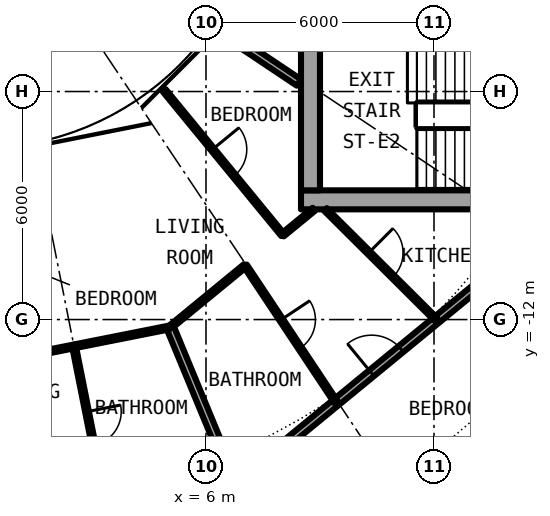
"""IFC4 building model, lengths in metres.
Left out: names, types, materials, properties, quantities, classifications, styles, units other than length and angle.
Written with IfcOpenShell. Run it as: python <this file> out.ifc"""

import sys

from ifc_helpers import new_model, si_unit, direction, frame, frame_2d, origin, place, context, subcontext, project, spatial, rectangle, extrude, element, fill, save


model = new_model("IFC4")
c1 = context("Model", 3, precision=1e-05, world=origin(), true_north=direction((0.0, 1.0)))
c2 = subcontext(c1, "Body", "Model", "MODEL_VIEW")
j1 = project(units=[si_unit("LENGTHUNIT", "METRE"), si_unit("PLANEANGLEUNIT", "RADIAN")], contexts=[c1])
p1 = place(None, origin())
s1 = spatial("IfcSite", under=j1, at=p1, CompositionType="ELEMENT")
p2 = place(p1, origin())
s2 = spatial("IfcBuilding", under=s1, at=p2, CompositionType="ELEMENT")
p3 = place(p2, frame((0.0, 0.0, 161.6)))
s3 = spatial("IfcBuildingStorey", under=s2, at=p3, CompositionType="ELEMENT", Elevation=161.6)
p4 = place(p3, frame((8.5, -8.85, 0.0), z_axis=(0.0, 0.0, 1.0), x_axis=(1.0, 0.0, 0.0)))
e1 = element("IfcWall", 1, at=p4, inside=s3, PredefinedType="SHEAR", context=c2, shape_type="SweptSolid", body=[
    extrude(rectangle(XDim=13.6, YDim=0.5, at=frame_2d((6.8, 0.0))), origin(), (0.0, 0.0, 1.0), 3.05),
])
p5 = place(p4, frame((11.375, 0.0, 0.0)))
e2 = element("IfcOpeningElement", 2, at=p5, cuts=e1, PredefinedType="OPENING", context=c2, shape_type="SweptSolid", body=[
    extrude(rectangle(XDim=1.2, YDim=2.3, at=frame_2d((0.6, 1.15))), frame((0.0, 0.26, 0.0), z_axis=(0.0, -1.0, 0.0), x_axis=(1.0, 0.0, 0.0)), (0.0, 0.0, 1.0), 0.52),
])
p6 = place(p3, frame((8.75, -8.6, 0.0), z_axis=(0.0, 0.0, 1.0), x_axis=(0.0, 1.0, 0.0)))
e3 = element("IfcWall", 3, at=p6, inside=s3, PredefinedType="SHEAR", context=c2, shape_type="SweptSolid", body=[
    extrude(rectangle(XDim=17.2, YDim=0.5, at=frame_2d((8.6, 0.0))), origin(), (0.0, 0.0, 1.0), 3.05),
])
p7 = place(p6, frame((7.4, 0.0, 0.1)))
e4 = element("IfcOpeningElement", 4, at=p7, cuts=e3, PredefinedType="OPENING", context=c2, shape_type="SweptSolid", body=[
    extrude(rectangle(XDim=2.4, YDim=2.2, at=frame_2d((1.2, 1.1))), frame((0.0, 0.26, 0.0), z_axis=(0.0, -1.0, 0.0), x_axis=(1.0, 0.0, 0.0)), (0.0, 0.0, 1.0), 0.52),
])
p8 = place(p3, frame((10.512, -19.667, 0.0), z_axis=(0.0, 0.0, 1.0), x_axis=(0.740947367223, 0.671563101283, 0.0)))
e5 = element("IfcWall", 5, at=p8, inside=s3, PredefinedType="PARTITIONING", context=c2, shape_type="SweptSolid", body=[
    extrude(rectangle(XDim=10.837, YDim=0.2, at=frame_2d((5.419, 0.0))), origin(), (0.0, 0.0, 1.0), 2.7),
])
p9 = place(p8, frame((3.835, 0.0, 0.0)))
e6 = element("IfcOpeningElement", 6, at=p9, cuts=e5, PredefinedType="OPENING", context=c2, shape_type="SweptSolid", body=[
    extrude(rectangle(XDim=1.0, YDim=2.3, at=frame_2d((0.5, 1.15))), frame((0.0, 0.11, 0.0), z_axis=(0.0, -1.0, 0.0), x_axis=(1.0, 0.0, 0.0)), (0.0, 0.0, 1.0), 0.22),
])
p10 = place(p3, frame((6.773, -16.353, 0.0), z_axis=(0.0, 0.0, 1.0), x_axis=(0.773034536097, 0.634363938131, 0.0)))
e7 = element("IfcWall", 7, at=p10, inside=s3, PredefinedType="PARTITIONING", context=c2, shape_type="SweptSolid", body=[
    extrude(rectangle(XDim=10.277, YDim=0.2, at=frame_2d((5.138, 0.0))), origin(), (0.0, 0.0, 1.0), 2.7),
])
p11 = place(p10, frame((4.638, 0.0, 0.0)))
e8 = element("IfcOpeningElement", 8, at=p11, cuts=e7, PredefinedType="OPENING", context=c2, shape_type="SweptSolid", body=[
    extrude(rectangle(XDim=1.0, YDim=2.3, at=frame_2d((0.5, 1.15))), frame((0.0, 0.11, 0.0), z_axis=(0.0, -1.0, 0.0), x_axis=(1.0, 0.0, 0.0)), (0.0, 0.0, 1.0), 0.22),
])
p12 = place(p3, frame((0.0, -13.209, 0.0), z_axis=(0.0, 0.0, 1.0), x_axis=(0.980766092797, 0.195186759846, 0.0)))
e9 = element("IfcWall", 9, at=p12, inside=s3, PredefinedType="PARTITIONING", context=c2, shape_type="SweptSolid", body=[
    extrude(rectangle(XDim=2.577, YDim=0.1, at=frame_2d((1.288, 0.0))), origin(), (0.0, 0.0, 1.0), 2.7),
])
p13 = place(p12, frame((0.838, 0.0, 0.0)))
e10 = element("IfcOpeningElement", 10, at=p13, cuts=e9, PredefinedType="OPENING", context=c2, shape_type="SweptSolid", body=[
    extrude(rectangle(XDim=0.9, YDim=2.3, at=frame_2d((0.45, 1.15))), frame((0.0, 0.06, 0.0), z_axis=(0.0, -1.0, 0.0), x_axis=(1.0, 0.0, 0.0)), (0.0, 0.0, 1.0), 0.12),
])
p14 = place(p3, frame((5.055, -12.204, 0.0), z_axis=(0.0, 0.0, 1.0), x_axis=(0.772943675046, 0.634474645046, 0.0)))
e11 = element("IfcWall", 11, at=p14, inside=s3, PredefinedType="PARTITIONING", context=c2, shape_type="SweptSolid", body=[
    extrude(rectangle(XDim=2.557, YDim=0.1, at=frame_2d((1.278, 0.0))), origin(), (0.0, 0.0, 1.0), 2.7),
])
p15 = place(p3, frame((8.016, -9.773, 0.0), z_axis=(0.0, 0.0, 1.0), x_axis=(0.7731800648, 0.634186555673, 0.0)))
e12 = element("IfcWall", 12, at=p15, inside=s3, PredefinedType="PARTITIONING", context=c2, shape_type="SweptSolid", body=[
    extrude(rectangle(XDim=1.064, YDim=0.1, at=frame_2d((0.532, 0.0))), origin(), (0.0, 0.0, 1.0), 2.7),
])
p16 = place(p3, frame((6.513, -4.472, 0.0), z_axis=(0.0, 0.0, 1.0), x_axis=(0.83133816625, -0.555766905579, 0.0)))
e13 = element("IfcWall", 13, at=p16, inside=s3, PredefinedType="PARTITIONING", context=c2, shape_type="SweptSolid", body=[
    extrude(rectangle(XDim=2.323, YDim=0.2, at=frame_2d((1.162, 0.0))), origin(), (0.0, 0.0, 1.0), 2.7),
])
p17 = place(p3, frame((2.527, -12.706, 0.0), z_axis=(0.0, 0.0, 1.0), x_axis=(0.1952206631, -0.980759344946, 0.0)))
e14 = element("IfcWall", 14, at=p17, inside=s3, PredefinedType="PARTITIONING", context=c2, shape_type="SweptSolid", body=[
    extrude(rectangle(XDim=4.405, YDim=0.1, at=frame_2d((2.202, 0.0))), origin(), (0.0, 0.0, 1.0), 2.7),
])
p18 = place(p17, frame((1.752, 0.0, 0.0)))
e15 = element("IfcOpeningElement", 15, at=p18, cuts=e14, PredefinedType="OPENING", context=c2, shape_type="SweptSolid", body=[
    extrude(rectangle(XDim=0.9, YDim=2.3, at=frame_2d((0.45, 1.15))), frame((0.0, 0.06, 0.0), z_axis=(0.0, -1.0, 0.0), x_axis=(1.0, 0.0, 0.0)), (0.0, 0.0, 1.0), 0.12),
])
p19 = place(p3, frame((4.898, -5.968, 0.0), z_axis=(0.0, 0.0, 1.0), x_axis=(0.634401778971, -0.773003481776, 0.0)))
e16 = element("IfcWall", 16, at=p19, inside=s3, PredefinedType="PARTITIONING", context=c2, shape_type="SweptSolid", body=[
    extrude(rectangle(XDim=4.92, YDim=0.1, at=frame_2d((2.46, 0.0))), origin(), (0.0, 0.0, 1.0), 2.7),
])
p20 = place(p19, frame((2.01, 0.0, 0.0)))
e17 = element("IfcOpeningElement", 17, at=p20, cuts=e16, PredefinedType="OPENING", context=c2, shape_type="SweptSolid", body=[
    extrude(rectangle(XDim=0.9, YDim=2.3, at=frame_2d((0.45, 1.15))), frame((0.0, 0.06, 0.0), z_axis=(0.0, -1.0, 0.0), x_axis=(1.0, 0.0, 0.0)), (0.0, 0.0, 1.0), 0.12),
])
p21 = place(p3, frame((5.055, -12.204, 0.0), z_axis=(0.0, 0.0, 1.0), x_axis=(0.38258387732, -0.923920763277, 0.0)))
e18 = element("IfcWall", 18, at=p21, inside=s3, PredefinedType="PARTITIONING", context=c2, shape_type="SweptSolid", body=[
    extrude(rectangle(XDim=4.49, YDim=0.2, at=frame_2d((2.245, 0.0))), origin(), (0.0, 0.0, 1.0), 2.7),
])
p22 = place(p3, frame((7.033, -10.581, 0.0), z_axis=(0.0, 0.0, 1.0), x_axis=(0.553865036342, -0.832606462573, 0.0)))
e19 = element("IfcWall", 19, at=p22, inside=s3, PredefinedType="PARTITIONING", context=c2, shape_type="SweptSolid", body=[
    extrude(rectangle(XDim=4.319, YDim=0.1, at=frame_2d((2.159, 0.0))), origin(), (0.0, 0.0, 1.0), 2.7),
])
p23 = place(p22, frame((1.709, 0.0, 0.0)))
e20 = element("IfcOpeningElement", 20, at=p23, cuts=e19, PredefinedType="OPENING", context=c2, shape_type="SweptSolid", body=[
    extrude(rectangle(XDim=0.9, YDim=2.3, at=frame_2d((0.45, 1.15))), frame((0.0, 0.06, 0.0), z_axis=(0.0, -1.0, 0.0), x_axis=(1.0, 0.0, 0.0)), (0.0, 0.0, 1.0), 0.12),
])
p24 = place(p3, frame((9.144, -9.104, 0.0), z_axis=(0.0, 0.0, 1.0), x_axis=(0.708793214553, -0.705416316088, 0.0)))
e21 = element("IfcWall", 21, at=p24, inside=s3, PredefinedType="PARTITIONING", context=c2, shape_type="SweptSolid", body=[
    extrude(rectangle(XDim=4.121, YDim=0.1, at=frame_2d((2.061, 0.0))), origin(), (0.0, 0.0, 1.0), 2.7),
])
p25 = place(p24, frame((1.611, 0.0, 0.0)))
e22 = element("IfcOpeningElement", 22, at=p25, cuts=e21, PredefinedType="OPENING", context=c2, shape_type="SweptSolid", body=[
    extrude(rectangle(XDim=0.9, YDim=2.3, at=frame_2d((0.45, 1.15))), frame((0.0, 0.06, 0.0), z_axis=(0.0, -1.0, 0.0), x_axis=(1.0, 0.0, 0.0)), (0.0, 0.0, 1.0), 0.12),
])
p26 = place(p3, frame((2.547, -12.702, 0.0), z_axis=(0.0, 0.0, 1.0), x_axis=(0.980857356895, 0.194727618547, 0.0)))
e23 = element("IfcWall", 23, at=p26, inside=s3, PredefinedType="PARTITIONING", context=c2, shape_type="SweptSolid", body=[
    extrude(rectangle(XDim=2.536, YDim=0.1, at=frame_2d((1.268, 0.0))), origin(), (0.0, 0.0, 1.0), 2.7),
])
p27 = place(p18, origin())
e24 = element("IfcDoor", 24, at=p27, inside=s3, OperationType="SINGLE_SWING_RIGHT", PredefinedType="DOOR", context=c2, shape_type="SweptSolid", body=[
    extrude(rectangle(XDim=0.9, YDim=2.3, at=frame_2d((0.45, 1.15))), frame((0.0, 0.025, 0.0), z_axis=(0.0, -1.0, 0.0), x_axis=(1.0, 0.0, 0.0)), (0.0, 0.0, 1.0), 0.05),
])
fill(e15, e24)
p28 = place(p11, origin())
e25 = element("IfcDoor", 25, at=p28, inside=s3, OperationType="SINGLE_SWING_RIGHT", PredefinedType="DOOR", context=c2, shape_type="SweptSolid", body=[
    extrude(rectangle(XDim=1.0, YDim=2.3, at=frame_2d((0.5, 1.15))), frame((0.0, 0.025, 0.0), z_axis=(0.0, -1.0, 0.0), x_axis=(1.0, 0.0, 0.0)), (0.0, 0.0, 1.0), 0.05),
])
fill(e8, e25)
p29 = place(p23, origin())
e26 = element("IfcDoor", 26, at=p29, inside=s3, OperationType="SINGLE_SWING_RIGHT", PredefinedType="DOOR", context=c2, shape_type="SweptSolid", body=[
    extrude(rectangle(XDim=0.9, YDim=2.3, at=frame_2d((0.45, 1.15))), frame((0.0, 0.025, 0.0), z_axis=(0.0, -1.0, 0.0), x_axis=(1.0, 0.0, 0.0)), (0.0, 0.0, 1.0), 0.05),
])
fill(e20, e26)
p30 = place(p25, origin())
e27 = element("IfcDoor", 27, at=p30, inside=s3, OperationType="SINGLE_SWING_RIGHT", PredefinedType="DOOR", context=c2, shape_type="SweptSolid", body=[
    extrude(rectangle(XDim=0.9, YDim=2.3, at=frame_2d((0.45, 1.15))), frame((0.0, 0.025, 0.0), z_axis=(0.0, -1.0, 0.0), x_axis=(1.0, 0.0, 0.0)), (0.0, 0.0, 1.0), 0.05),
])
fill(e22, e27)
p31 = place(p20, origin())
e28 = element("IfcDoor", 28, at=p31, inside=s3, OperationType="SINGLE_SWING_RIGHT", PredefinedType="DOOR", context=c2, shape_type="SweptSolid", body=[
    extrude(rectangle(XDim=0.9, YDim=2.3, at=frame_2d((0.45, 1.15))), frame((0.0, 0.025, 0.0), z_axis=(0.0, -1.0, 0.0), x_axis=(1.0, 0.0, 0.0)), (0.0, 0.0, 1.0), 0.05),
])
fill(e17, e28)
save(model, sys.argv[1])
